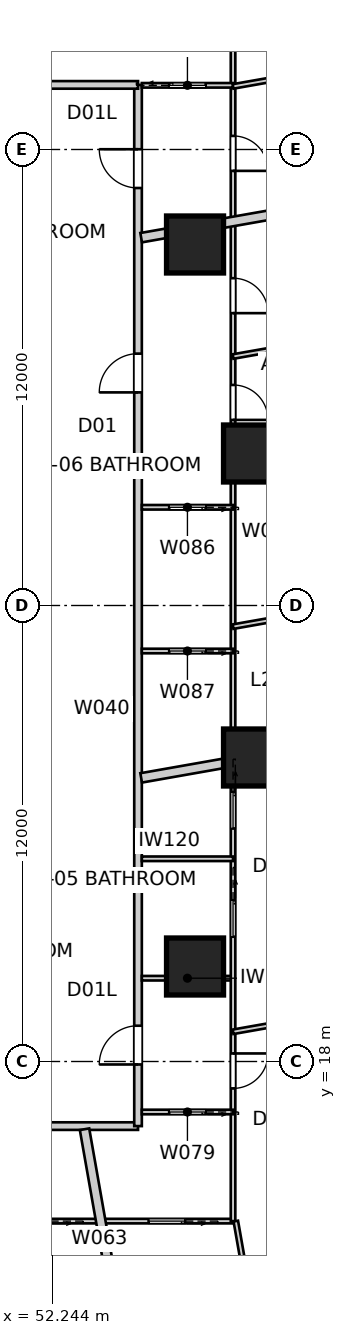
"""IFC4 building model, lengths in metres.
Left out: names, types, materials, properties, quantities, classifications, styles, units other than length and angle.
Written with IfcOpenShell. Run it as: python <this file> out.ifc"""

import sys

from ifc_helpers import new_model, si_unit, direction, frame, frame_2d, origin, origin_2d, place, context, subcontext, project, spatial, rectangle, extrude, element, fill, save


model = new_model("IFC4")
c1 = context("Model", 3, precision=1e-05, world=origin(), true_north=direction((0.0, 1.0)))
c2 = subcontext(c1, "Body", "Model", "MODEL_VIEW")
j1 = project(units=[si_unit("LENGTHUNIT", "METRE"), si_unit("PLANEANGLEUNIT", "RADIAN")], contexts=[c1])
p1 = place(None, origin())
s1 = spatial("IfcSite", under=j1, at=p1, CompositionType="ELEMENT")
p2 = place(p1, origin())
s2 = spatial("IfcBuilding", under=s1, at=p2, CompositionType="ELEMENT")
p3 = place(p2, frame((0.0, 0.0, 89.6)))
s3 = spatial("IfcBuildingStorey", under=s2, at=p3, CompositionType="ELEMENT", Elevation=89.6)
for number, where, z_axis, x_axis in (
    (1, (57.5, 26.0, 0.0), (0.0, 0.0, 1.0), (1.0, 0.0, 0.0)),
    (2, (57.5, 34.0, 0.0), (0.0, 0.0, 1.0), (1.0, 0.0, 0.0)),
    (3, (56.0, 39.5, 0.0), (0.0, 0.0, 1.0), (1.0, 0.0, 0.0)),
    (4, (56.0, 20.5, 0.0), (0.0, 0.0, 1.0), (1.0, 0.0, 0.0)),
):
    element("IfcColumn", number, at=place(p3, frame(where, z_axis=z_axis, x_axis=x_axis)), inside=s3, PredefinedType="COLUMN", context=c2, shape_type="SweptSolid", body=[
        extrude(rectangle(XDim=1.5, YDim=1.5, at=origin_2d()), origin(), (0.0, 0.0, 1.0), 3.4),
    ])
p4 = place(p3, frame((25.5, 16.3, 0.0), z_axis=(0.0, 0.0, 1.0), x_axis=(1.0, 0.0, 0.0)))
e5 = element("IfcWall", 5, at=p4, inside=s3, PredefinedType="PARTITIONING", context=c2, shape_type="SweptSolid", body=[
    extrude(rectangle(XDim=29.0, YDim=0.2, at=frame_2d((14.5, 0.0))), origin(), (0.0, 0.0, 1.0), 3.25),
])
p5 = place(p4, frame((20.896, 0.0, 0.0)))
e6 = element("IfcOpeningElement", 6, at=p5, cuts=e5, PredefinedType="OPENING", context=c2, shape_type="SweptSolid", body=[
    extrude(rectangle(XDim=1.02, YDim=2.34, at=frame_2d((0.51, 1.17))), frame((0.0, 0.11, 0.0), z_axis=(0.0, -1.0, 0.0), x_axis=(1.0, 0.0, 0.0)), (0.0, 0.0, 1.0), 0.22),
])
p6 = place(p4, frame((14.257, 0.0, 0.0)))
e7 = element("IfcOpeningElement", 7, at=p6, cuts=e5, PredefinedType="OPENING", context=c2, shape_type="SweptSolid", body=[
    extrude(rectangle(XDim=1.02, YDim=2.34, at=frame_2d((0.51, 1.17))), frame((0.0, 0.11, 0.0), z_axis=(0.0, -1.0, 0.0), x_axis=(1.0, 0.0, 0.0)), (0.0, 0.0, 1.0), 0.22),
])
p7 = place(p4, frame((3.857, 0.0, 0.0)))
e8 = element("IfcOpeningElement", 8, at=p7, cuts=e5, PredefinedType="OPENING", context=c2, shape_type="SweptSolid", body=[
    extrude(rectangle(XDim=1.02, YDim=2.34, at=frame_2d((0.51, 1.17))), frame((0.0, 0.11, 0.0), z_axis=(0.0, -1.0, 0.0), x_axis=(1.0, 0.0, 0.0)), (0.0, 0.0, 1.0), 0.22),
])
p8 = place(p3, frame((54.5, 16.3, 0.0), z_axis=(0.0, 0.0, 1.0), x_axis=(0.0, 1.0, 0.0)))
e9 = element("IfcWall", 9, at=p8, inside=s3, PredefinedType="PARTITIONING", context=c2, shape_type="SweptSolid", body=[
    extrude(rectangle(XDim=27.4, YDim=0.2, at=frame_2d((13.7, 0.0))), origin(), (0.0, 0.0, 1.0), 3.25),
])
p9 = place(p8, frame((19.308, 0.0, 0.0)))
e10 = element("IfcOpeningElement", 10, at=p9, cuts=e9, PredefinedType="OPENING", context=c2, shape_type="SweptSolid", body=[
    extrude(rectangle(XDim=1.02, YDim=2.34, at=frame_2d((0.51, 1.17))), frame((0.0, 0.11, 0.0), z_axis=(0.0, -1.0, 0.0), x_axis=(1.0, 0.0, 0.0)), (0.0, 0.0, 1.0), 0.22),
])
p10 = place(p8, frame((24.687, 0.0, 0.0)))
e11 = element("IfcOpeningElement", 11, at=p10, cuts=e9, PredefinedType="OPENING", context=c2, shape_type="SweptSolid", body=[
    extrude(rectangle(XDim=1.02, YDim=2.1, at=frame_2d((0.51, 1.05))), frame((0.0, 0.11, 0.0), z_axis=(0.0, -1.0, 0.0), x_axis=(1.0, 0.0, 0.0)), (0.0, 0.0, 1.0), 0.22),
])
p11 = place(p8, frame((1.622, 0.0, 0.0)))
e12 = element("IfcOpeningElement", 12, at=p11, cuts=e9, PredefinedType="OPENING", context=c2, shape_type="SweptSolid", body=[
    extrude(rectangle(XDim=1.02, YDim=2.1, at=frame_2d((0.51, 1.05))), frame((0.0, 0.11, 0.0), z_axis=(0.0, -1.0, 0.0), x_axis=(1.0, 0.0, 0.0)), (0.0, 0.0, 1.0), 0.22),
])
p12 = place(p3, frame((54.5, 43.7, 0.0), z_axis=(0.0, 0.0, 1.0), x_axis=(-1.0, 0.0, 0.0)))
e13 = element("IfcWall", 13, at=p12, inside=s3, PredefinedType="PARTITIONING", context=c2, shape_type="SweptSolid", body=[
    extrude(rectangle(XDim=29.0, YDim=0.2, at=frame_2d((14.5, 0.0))), origin(), (0.0, 0.0, 1.0), 3.25),
])
p13 = place(p12, frame((11.951, 0.0, 0.0)))
e14 = element("IfcOpeningElement", 14, at=p13, cuts=e13, PredefinedType="OPENING", context=c2, shape_type="SweptSolid", body=[
    extrude(rectangle(XDim=1.02, YDim=2.34, at=frame_2d((0.51, 1.17))), frame((0.0, 0.11, 0.0), z_axis=(0.0, -1.0, 0.0), x_axis=(1.0, 0.0, 0.0)), (0.0, 0.0, 1.0), 0.22),
])
p14 = place(p12, frame((4.795, 0.0, 0.0)))
e15 = element("IfcOpeningElement", 15, at=p14, cuts=e13, PredefinedType="OPENING", context=c2, shape_type="SweptSolid", body=[
    extrude(rectangle(XDim=1.02, YDim=2.34, at=frame_2d((0.51, 1.17))), frame((0.0, 0.11, 0.0), z_axis=(0.0, -1.0, 0.0), x_axis=(1.0, 0.0, 0.0)), (0.0, 0.0, 1.0), 0.22),
])
p15 = place(p3, frame((63.405, 41.235, 0.0), z_axis=(0.0, 0.0, 1.0), x_axis=(-0.984806596137, -0.173654738504, 0.0)))
e16 = element("IfcWall", 16, at=p15, inside=s3, PredefinedType="PARTITIONING", context=c2, shape_type="SweptSolid", body=[
    extrude(rectangle(XDim=8.958, YDim=0.25, at=frame_2d((4.479, 0.0))), origin(), (0.0, 0.0, 1.0), 3.25),
])
p16 = place(p3, frame((65.836, 27.448, 0.0), z_axis=(0.0, 0.0, 1.0), x_axis=(-0.98481000304, -0.173635416642, 0.0)))
e17 = element("IfcWall", 17, at=p16, inside=s3, PredefinedType="PARTITIONING", context=c2, shape_type="SweptSolid", body=[
    extrude(rectangle(XDim=11.427, YDim=0.25, at=frame_2d((5.713, 0.0))), origin(), (0.0, 0.0, 1.0), 3.25),
])
p17 = place(p3, frame((54.682, 7.203, 0.0), z_axis=(0.0, 0.0, 1.0), x_axis=(-0.173630137029, 0.984810933893, 0.0)))
e18 = element("IfcWall", 18, at=p17, inside=s3, PredefinedType="PARTITIONING", context=c2, shape_type="SweptSolid", body=[
    extrude(rectangle(XDim=9.154, YDim=0.25, at=frame_2d((4.577, 0.0))), origin(), (0.0, 0.0, 1.0), 3.25),
])
p18 = place(p3, frame((57.0, 13.8, 0.0), z_axis=(0.0, 0.0, 1.0), x_axis=(-1.0, 0.0, 0.0)))
e19 = element("IfcWall", 19, at=p18, inside=s3, PredefinedType="PARTITIONING", context=c2, shape_type="SweptSolid", body=[
    extrude(rectangle(XDim=34.0, YDim=0.12, at=frame_2d((17.0, 0.0))), origin(), (0.0, 0.0, 1.0), 2.55),
])
p19 = place(p18, frame((8.768, 0.0, 0.0)))
e20 = element("IfcOpeningElement", 20, at=p19, cuts=e19, PredefinedType="OPENING", context=c2, shape_type="SweptSolid", body=[
    extrude(rectangle(XDim=0.92, YDim=2.34, at=frame_2d((0.46, 1.17))), frame((0.0, 0.07, 0.0), z_axis=(0.0, -1.0, 0.0), x_axis=(1.0, 0.0, 0.0)), (0.0, 0.0, 1.0), 0.14),
])
p20 = place(p18, frame((10.995, 0.0, 0.0)))
e21 = element("IfcOpeningElement", 21, at=p20, cuts=e19, PredefinedType="OPENING", context=c2, shape_type="SweptSolid", body=[
    extrude(rectangle(XDim=0.92, YDim=2.34, at=frame_2d((0.46, 1.17))), frame((0.0, 0.07, 0.0), z_axis=(0.0, -1.0, 0.0), x_axis=(1.0, 0.0, 0.0)), (0.0, 0.0, 1.0), 0.14),
])
p21 = place(p18, frame((15.486, 0.0, 0.0)))
e22 = element("IfcOpeningElement", 22, at=p21, cuts=e19, PredefinedType="OPENING", context=c2, shape_type="SweptSolid", body=[
    extrude(rectangle(XDim=0.92, YDim=2.34, at=frame_2d((0.46, 1.17))), frame((0.0, 0.07, 0.0), z_axis=(0.0, -1.0, 0.0), x_axis=(1.0, 0.0, 0.0)), (0.0, 0.0, 1.0), 0.14),
])
p22 = place(p18, frame((4.804, 0.0, 0.0)))
e23 = element("IfcOpeningElement", 23, at=p22, cuts=e19, PredefinedType="OPENING", context=c2, shape_type="SweptSolid", body=[
    extrude(rectangle(XDim=0.96, YDim=2.1, at=frame_2d((0.48, 1.05))), frame((0.0, 0.07, 0.0), z_axis=(0.0, -1.0, 0.0), x_axis=(1.0, 0.0, 0.0)), (0.0, 0.0, 1.0), 0.14),
])
p23 = place(p18, frame((19.155, 0.0, 0.0)))
e24 = element("IfcOpeningElement", 24, at=p23, cuts=e19, PredefinedType="OPENING", context=c2, shape_type="SweptSolid", body=[
    extrude(rectangle(XDim=0.96, YDim=2.1, at=frame_2d((0.48, 1.05))), frame((0.0, 0.07, 0.0), z_axis=(0.0, -1.0, 0.0), x_axis=(1.0, 0.0, 0.0)), (0.0, 0.0, 1.0), 0.14),
])
p24 = place(p18, frame((31.473, 0.0, 0.0)))
e25 = element("IfcOpeningElement", 25, at=p24, cuts=e19, PredefinedType="OPENING", context=c2, shape_type="SweptSolid", body=[
    extrude(rectangle(XDim=0.96, YDim=2.1, at=frame_2d((0.48, 1.05))), frame((0.0, 0.07, 0.0), z_axis=(0.0, -1.0, 0.0), x_axis=(1.0, 0.0, 0.0)), (0.0, 0.0, 1.0), 0.14),
])
p25 = place(p18, frame((1.261, 0.0, 0.0)))
e26 = element("IfcOpeningElement", 26, at=p25, cuts=e19, PredefinedType="OPENING", context=c2, shape_type="SweptSolid", body=[
    extrude(rectangle(XDim=0.96, YDim=2.1, at=frame_2d((0.48, 1.05))), frame((0.0, 0.07, 0.0), z_axis=(0.0, -1.0, 0.0), x_axis=(1.0, 0.0, 0.0)), (0.0, 0.0, 1.0), 0.14),
])
p26 = place(p18, frame((22.627, 0.0, 0.0)))
e27 = element("IfcOpeningElement", 27, at=p26, cuts=e19, PredefinedType="OPENING", context=c2, shape_type="SweptSolid", body=[
    extrude(rectangle(XDim=0.96, YDim=2.1, at=frame_2d((0.48, 1.05))), frame((0.0, 0.07, 0.0), z_axis=(0.0, -1.0, 0.0), x_axis=(1.0, 0.0, 0.0)), (0.0, 0.0, 1.0), 0.14),
])
p27 = place(p3, frame((54.6, 20.192, 0.0), z_axis=(0.0, 0.0, 1.0), x_axis=(1.0, 0.0, 0.0)))
e28 = element("IfcWall", 28, at=p27, inside=s3, PredefinedType="PARTITIONING", context=c2, shape_type="SweptSolid", body=[
    extrude(rectangle(XDim=2.4, YDim=0.12, at=frame_2d((1.2, 0.0))), origin(), (0.0, 0.0, 1.0), 3.25),
])
p28 = place(p3, frame((57.0, 46.2, 0.0), z_axis=(0.0, 0.0, 1.0), x_axis=(0.0, -1.0, 0.0)))
e29 = element("IfcWall", 29, at=p28, inside=s3, PredefinedType="PARTITIONING", context=c2, shape_type="SweptSolid", body=[
    extrude(rectangle(XDim=32.4, YDim=0.12, at=frame_2d((16.2, 0.0))), origin(), (0.0, 0.0, 1.0), 2.55),
])
p29 = place(p28, frame((10.396, 0.0, 0.0)))
e30 = element("IfcOpeningElement", 30, at=p29, cuts=e29, PredefinedType="OPENING", context=c2, shape_type="SweptSolid", body=[
    extrude(rectangle(XDim=0.92, YDim=2.34, at=frame_2d((0.46, 1.17))), frame((0.0, 0.07, 0.0), z_axis=(0.0, -1.0, 0.0), x_axis=(1.0, 0.0, 0.0)), (0.0, 0.0, 1.0), 0.14),
])
p30 = place(p28, frame((7.587, 0.0, 0.0)))
e31 = element("IfcOpeningElement", 31, at=p30, cuts=e29, PredefinedType="OPENING", context=c2, shape_type="SweptSolid", body=[
    extrude(rectangle(XDim=0.92, YDim=2.34, at=frame_2d((0.46, 1.17))), frame((0.0, 0.07, 0.0), z_axis=(0.0, -1.0, 0.0), x_axis=(1.0, 0.0, 0.0)), (0.0, 0.0, 1.0), 0.14),
])
p31 = place(p28, frame((3.843, 0.0, 0.0)))
e32 = element("IfcOpeningElement", 32, at=p31, cuts=e29, PredefinedType="OPENING", context=c2, shape_type="SweptSolid", body=[
    extrude(rectangle(XDim=0.92, YDim=2.34, at=frame_2d((0.46, 1.17))), frame((0.0, 0.07, 0.0), z_axis=(0.0, -1.0, 0.0), x_axis=(1.0, 0.0, 0.0)), (0.0, 0.0, 1.0), 0.14),
])
p32 = place(p28, frame((27.988, 0.0, 0.0)))
e33 = element("IfcOpeningElement", 33, at=p32, cuts=e29, PredefinedType="OPENING", context=c2, shape_type="SweptSolid", body=[
    extrude(rectangle(XDim=0.92, YDim=2.34, at=frame_2d((0.46, 1.17))), frame((0.0, 0.07, 0.0), z_axis=(0.0, -1.0, 0.0), x_axis=(1.0, 0.0, 0.0)), (0.0, 0.0, 1.0), 0.14),
])
p33 = place(p28, frame((23.957, 0.0, 0.0)))
e34 = element("IfcOpeningElement", 34, at=p33, cuts=e29, PredefinedType="OPENING", context=c2, shape_type="SweptSolid", body=[
    extrude(rectangle(XDim=0.96, YDim=2.1, at=frame_2d((0.48, 1.05))), frame((0.0, 0.07, 0.0), z_axis=(0.0, -1.0, 0.0), x_axis=(1.0, 0.0, 0.0)), (0.0, 0.0, 1.0), 0.14),
])
p34 = place(p28, frame((21.108, 0.0, 0.0)))
e35 = element("IfcOpeningElement", 35, at=p34, cuts=e29, PredefinedType="OPENING", context=c2, shape_type="SweptSolid", body=[
    extrude(rectangle(XDim=0.96, YDim=2.1, at=frame_2d((0.48, 1.05))), frame((0.0, 0.07, 0.0), z_axis=(0.0, -1.0, 0.0), x_axis=(1.0, 0.0, 0.0)), (0.0, 0.0, 1.0), 0.14),
])
p35 = place(p3, frame((57.0, 16.671, 0.0), z_axis=(0.0, 0.0, 1.0), x_axis=(-1.0, 0.0, 0.0)))
e36 = element("IfcWall", 36, at=p35, inside=s3, PredefinedType="PARTITIONING", context=c2, shape_type="SweptSolid", body=[
    extrude(rectangle(XDim=2.4, YDim=0.12, at=frame_2d((1.2, 0.0))), origin(), (0.0, 0.0, 1.0), 3.25),
])
p36 = place(p35, frame((0.72, 0.0, 0.0)))
e37 = element("IfcOpeningElement", 37, at=p36, cuts=e36, PredefinedType="OPENING", context=c2, shape_type="SweptSolid", body=[
    extrude(rectangle(XDim=0.96, YDim=2.1, at=frame_2d((0.48, 1.05))), frame((0.0, 0.07, 0.0), z_axis=(0.0, -1.0, 0.0), x_axis=(1.0, 0.0, 0.0)), (0.0, 0.0, 1.0), 0.14),
])
p37 = place(p3, frame((54.6, 23.335, 0.0), z_axis=(0.0, 0.0, 1.0), x_axis=(1.0, 0.0, 0.0)))
e38 = element("IfcWall", 38, at=p37, inside=s3, PredefinedType="PARTITIONING", context=c2, shape_type="SweptSolid", body=[
    extrude(rectangle(XDim=2.4, YDim=0.12, at=frame_2d((1.2, 0.0))), origin(), (0.0, 0.0, 1.0), 3.25),
])
p38 = place(p3, frame((67.012, 20.547, 0.0), z_axis=(0.0, 0.0, 1.0), x_axis=(-0.984807724889, -0.173648337162, 0.0)))
e39 = element("IfcWall", 39, at=p38, inside=s3, PredefinedType="PARTITIONING", context=c2, shape_type="SweptSolid", body=[
    extrude(rectangle(XDim=10.167, YDim=0.12, at=frame_2d((5.083, 0.0))), origin(), (0.0, 0.0, 1.0), 2.638),
])
p39 = place(p38, frame((8.328, 0.0, 0.0)))
e40 = element("IfcOpeningElement", 40, at=p39, cuts=e39, PredefinedType="OPENING", context=c2, shape_type="SweptSolid", body=[
    extrude(rectangle(XDim=0.92, YDim=2.34, at=frame_2d((0.46, 1.17))), frame((0.0, 0.07, 0.0), z_axis=(0.0, -1.0, 0.0), x_axis=(1.0, 0.0, 0.0)), (0.0, 0.0, 1.0), 0.14),
])
p40 = place(p3, frame((58.122, 7.85, 0.0), z_axis=(0.0, 0.0, 1.0), x_axis=(-0.173644708382, 0.984808364734, 0.0)))
e41 = element("IfcWall", 41, at=p40, inside=s3, PredefinedType="PARTITIONING", context=c2, shape_type="SweptSolid", body=[
    extrude(rectangle(XDim=6.042, YDim=0.12, at=frame_2d((3.021, 0.0))), origin(), (0.0, 0.0, 1.0), 2.638),
])
p41 = place(p3, frame((57.0, 32.585, 0.0), z_axis=(0.0, 0.0, 1.0), x_axis=(-1.0, 0.0, 0.0)))
e42 = element("IfcWall", 42, at=p41, inside=s3, PredefinedType="PARTITIONING", context=c2, shape_type="SweptSolid", body=[
    extrude(rectangle(XDim=2.4, YDim=0.12, at=frame_2d((1.2, 0.0))), origin(), (0.0, 0.0, 1.0), 3.25),
])
p42 = place(p41, frame((0.72, 0.0, 0.0)))
e43 = element("IfcOpeningElement", 43, at=p42, cuts=e42, PredefinedType="OPENING", context=c2, shape_type="SweptSolid", body=[
    extrude(rectangle(XDim=0.96, YDim=2.1, at=frame_2d((0.48, 1.05))), frame((0.0, 0.07, 0.0), z_axis=(0.0, -1.0, 0.0), x_axis=(1.0, 0.0, 0.0)), (0.0, 0.0, 1.0), 0.14),
])
p43 = place(p3, frame((57.0, 28.802, 0.0), z_axis=(0.0, 0.0, 1.0), x_axis=(-1.0, 0.0, 0.0)))
e44 = element("IfcWall", 44, at=p43, inside=s3, PredefinedType="PARTITIONING", context=c2, shape_type="SweptSolid", body=[
    extrude(rectangle(XDim=2.4, YDim=0.12, at=frame_2d((1.2, 0.0))), origin(), (0.0, 0.0, 1.0), 3.25),
])
p44 = place(p43, frame((0.72, 0.0, 0.0)))
e45 = element("IfcOpeningElement", 45, at=p44, cuts=e44, PredefinedType="OPENING", context=c2, shape_type="SweptSolid", body=[
    extrude(rectangle(XDim=0.96, YDim=2.1, at=frame_2d((0.48, 1.05))), frame((0.0, 0.07, 0.0), z_axis=(0.0, -1.0, 0.0), x_axis=(1.0, 0.0, 0.0)), (0.0, 0.0, 1.0), 0.14),
])
p45 = place(p3, frame((65.188, 30.887, 0.0), z_axis=(0.0, 0.0, 1.0), x_axis=(-0.984807787824, -0.173647980238, 0.0)))
e46 = element("IfcWall", 46, at=p45, inside=s3, PredefinedType="PARTITIONING", context=c2, shape_type="SweptSolid", body=[
    extrude(rectangle(XDim=8.315, YDim=0.12, at=frame_2d((4.157, 0.0))), origin(), (0.0, 0.0, 1.0), 3.25),
])
p46 = place(p45, frame((3.677, 0.0, 0.0)))
e47 = element("IfcOpeningElement", 47, at=p46, cuts=e46, PredefinedType="OPENING", context=c2, shape_type="SweptSolid", body=[
    extrude(rectangle(XDim=0.92, YDim=2.34, at=frame_2d((0.46, 1.17))), frame((0.0, 0.07, 0.0), z_axis=(0.0, -1.0, 0.0), x_axis=(1.0, 0.0, 0.0)), (0.0, 0.0, 1.0), 0.14),
])
p47 = place(p3, frame((57.0, 36.552, 0.0), z_axis=(0.0, 0.0, 1.0), x_axis=(0.984809234282, 0.173639776761, 0.0)))
e48 = element("IfcWall", 48, at=p47, inside=s3, PredefinedType="PARTITIONING", context=c2, shape_type="SweptSolid", body=[
    extrude(rectangle(XDim=7.081, YDim=0.12, at=frame_2d((3.541, 0.0))), origin(), (0.0, 0.0, 1.0), 3.25),
])
p48 = place(p3, frame((54.6, 43.689, 0.0), z_axis=(0.0, 0.0, 1.0), x_axis=(1.0, 0.0, 0.0)))
e49 = element("IfcWall", 49, at=p48, inside=s3, PredefinedType="PARTITIONING", context=c2, shape_type="SweptSolid", body=[
    extrude(rectangle(XDim=2.4, YDim=0.12, at=frame_2d((1.2, 0.0))), origin(), (0.0, 0.0, 1.0), 3.25),
])
p49 = place(p48, frame((0.72, 0.0, 0.0)))
e50 = element("IfcOpeningElement", 50, at=p49, cuts=e49, PredefinedType="OPENING", context=c2, shape_type="SweptSolid", body=[
    extrude(rectangle(XDim=0.96, YDim=2.1, at=frame_2d((0.48, 1.05))), frame((0.0, 0.07, 0.0), z_axis=(0.0, -1.0, 0.0), x_axis=(1.0, 0.0, 0.0)), (0.0, 0.0, 1.0), 0.14),
])
p50 = place(p3, frame((62.758, 44.675, 0.0), z_axis=(0.0, 0.0, 1.0), x_axis=(-0.984810032319, -0.173635250578, 0.0)))
e51 = element("IfcWall", 51, at=p50, inside=s3, PredefinedType="PARTITIONING", context=c2, shape_type="SweptSolid", body=[
    extrude(rectangle(XDim=5.846, YDim=0.12, at=frame_2d((2.923, 0.0))), origin(), (0.0, 0.0, 1.0), 3.25),
])
p51 = place(p50, frame((2.443, 0.0, 0.0)))
e52 = element("IfcOpeningElement", 52, at=p51, cuts=e51, PredefinedType="OPENING", context=c2, shape_type="SweptSolid", body=[
    extrude(rectangle(XDim=0.92, YDim=2.34, at=frame_2d((0.46, 1.17))), frame((0.0, 0.07, 0.0), z_axis=(0.0, -1.0, 0.0), x_axis=(1.0, 0.0, 0.0)), (0.0, 0.0, 1.0), 0.14),
])
p52 = place(p9, origin())
e53 = element("IfcDoor", 53, at=p52, inside=s3, OperationType="SINGLE_SWING_LEFT", PredefinedType="DOOR", context=c2, shape_type="SweptSolid", body=[
    extrude(rectangle(XDim=1.02, YDim=2.34, at=frame_2d((0.51, 1.17))), frame((0.0, 0.025, 0.0), z_axis=(0.0, -1.0, 0.0), x_axis=(1.0, 0.0, 0.0)), (0.0, 0.0, 1.0), 0.05),
])
fill(e10, e53)
p53 = place(p10, origin())
e54 = element("IfcDoor", 54, at=p53, inside=s3, OperationType="SINGLE_SWING_RIGHT", PredefinedType="DOOR", context=c2, shape_type="SweptSolid", body=[
    extrude(rectangle(XDim=1.02, YDim=2.1, at=frame_2d((0.51, 1.05))), frame((0.0, 0.025, 0.0), z_axis=(0.0, -1.0, 0.0), x_axis=(1.0, 0.0, 0.0)), (0.0, 0.0, 1.0), 0.05),
])
fill(e11, e54)
p54 = place(p11, origin())
e55 = element("IfcDoor", 55, at=p54, inside=s3, OperationType="SINGLE_SWING_LEFT", PredefinedType="DOOR", context=c2, shape_type="SweptSolid", body=[
    extrude(rectangle(XDim=1.02, YDim=2.1, at=frame_2d((0.51, 1.05))), frame((0.0, 0.025, 0.0), z_axis=(0.0, -1.0, 0.0), x_axis=(1.0, 0.0, 0.0)), (0.0, 0.0, 1.0), 0.05),
])
fill(e12, e55)
p55 = place(p29, origin())
e56 = element("IfcDoor", 56, at=p55, inside=s3, OperationType="SINGLE_SWING_RIGHT", PredefinedType="DOOR", context=c2, shape_type="SweptSolid", body=[
    extrude(rectangle(XDim=0.92, YDim=2.34, at=frame_2d((0.46, 1.17))), frame((0.0, 0.025, 0.0), z_axis=(0.0, -1.0, 0.0), x_axis=(1.0, 0.0, 0.0)), (0.0, 0.0, 1.0), 0.05),
])
fill(e30, e56)
p56 = place(p30, origin())
e57 = element("IfcDoor", 57, at=p56, inside=s3, OperationType="SINGLE_SWING_RIGHT", PredefinedType="DOOR", context=c2, shape_type="SweptSolid", body=[
    extrude(rectangle(XDim=0.92, YDim=2.34, at=frame_2d((0.46, 1.17))), frame((0.0, 0.025, 0.0), z_axis=(0.0, -1.0, 0.0), x_axis=(1.0, 0.0, 0.0)), (0.0, 0.0, 1.0), 0.05),
])
fill(e31, e57)
p57 = place(p42, origin())
e58 = element("IfcDoor", 58, at=p57, inside=s3, OperationType="SLIDING_TO_LEFT", PredefinedType="DOOR", context=c2, shape_type="SweptSolid", body=[
    extrude(rectangle(XDim=0.96, YDim=2.1, at=frame_2d((0.48, 1.05))), frame((0.0, 0.025, 0.0), z_axis=(0.0, -1.0, 0.0), x_axis=(1.0, 0.0, 0.0)), (0.0, 0.0, 1.0), 0.05),
])
fill(e43, e58)
p58 = place(p31, origin())
e59 = element("IfcDoor", 59, at=p58, inside=s3, OperationType="SINGLE_SWING_RIGHT", PredefinedType="DOOR", context=c2, shape_type="SweptSolid", body=[
    extrude(rectangle(XDim=0.92, YDim=2.34, at=frame_2d((0.46, 1.17))), frame((0.0, 0.025, 0.0), z_axis=(0.0, -1.0, 0.0), x_axis=(1.0, 0.0, 0.0)), (0.0, 0.0, 1.0), 0.05),
])
fill(e32, e59)
p59 = place(p49, origin())
e60 = element("IfcDoor", 60, at=p59, inside=s3, OperationType="SLIDING_TO_LEFT", PredefinedType="DOOR", context=c2, shape_type="SweptSolid", body=[
    extrude(rectangle(XDim=0.96, YDim=2.1, at=frame_2d((0.48, 1.05))), frame((0.0, 0.025, 0.0), z_axis=(0.0, -1.0, 0.0), x_axis=(1.0, 0.0, 0.0)), (0.0, 0.0, 1.0), 0.05),
])
fill(e50, e60)
p60 = place(p36, origin())
e61 = element("IfcDoor", 61, at=p60, inside=s3, OperationType="SLIDING_TO_LEFT", PredefinedType="DOOR", context=c2, shape_type="SweptSolid", body=[
    extrude(rectangle(XDim=0.96, YDim=2.1, at=frame_2d((0.48, 1.05))), frame((0.0, 0.025, 0.0), z_axis=(0.0, -1.0, 0.0), x_axis=(1.0, 0.0, 0.0)), (0.0, 0.0, 1.0), 0.05),
])
fill(e37, e61)
p61 = place(p32, origin())
e62 = element("IfcDoor", 62, at=p61, inside=s3, OperationType="SINGLE_SWING_LEFT", PredefinedType="DOOR", context=c2, shape_type="SweptSolid", body=[
    extrude(rectangle(XDim=0.92, YDim=2.34, at=frame_2d((0.46, 1.17))), frame((0.0, 0.025, 0.0), z_axis=(0.0, -1.0, 0.0), x_axis=(1.0, 0.0, 0.0)), (0.0, 0.0, 1.0), 0.05),
])
fill(e33, e62)
p62 = place(p44, origin())
e63 = element("IfcDoor", 63, at=p62, inside=s3, OperationType="SLIDING_TO_LEFT", PredefinedType="DOOR", context=c2, shape_type="SweptSolid", body=[
    extrude(rectangle(XDim=0.96, YDim=2.1, at=frame_2d((0.48, 1.05))), frame((0.0, 0.025, 0.0), z_axis=(0.0, -1.0, 0.0), x_axis=(1.0, 0.0, 0.0)), (0.0, 0.0, 1.0), 0.05),
])
fill(e45, e63)
p63 = place(p25, origin())
e64 = element("IfcDoor", 64, at=p63, inside=s3, OperationType="SLIDING_TO_LEFT", PredefinedType="DOOR", context=c2, shape_type="SweptSolid", body=[
    extrude(rectangle(XDim=0.96, YDim=2.1, at=frame_2d((0.48, 1.05))), frame((0.0, 0.025, 0.0), z_axis=(0.0, -1.0, 0.0), x_axis=(1.0, 0.0, 0.0)), (0.0, 0.0, 1.0), 0.05),
])
fill(e26, e64)
p64 = place(p33, origin())
e65 = element("IfcDoor", 65, at=p64, inside=s3, OperationType="SLIDING_TO_LEFT", PredefinedType="DOOR", context=c2, shape_type="SweptSolid", body=[
    extrude(rectangle(XDim=0.96, YDim=2.1, at=frame_2d((0.48, 1.05))), frame((0.0, 0.025, 0.0), z_axis=(0.0, -1.0, 0.0), x_axis=(1.0, 0.0, 0.0)), (0.0, 0.0, 1.0), 0.05),
])
fill(e34, e65)
p65 = place(p34, origin())
e66 = element("IfcDoor", 66, at=p65, inside=s3, OperationType="SLIDING_TO_LEFT", PredefinedType="DOOR", context=c2, shape_type="SweptSolid", body=[
    extrude(rectangle(XDim=0.96, YDim=2.1, at=frame_2d((0.48, 1.05))), frame((0.0, 0.025, 0.0), z_axis=(0.0, -1.0, 0.0), x_axis=(1.0, 0.0, 0.0)), (0.0, 0.0, 1.0), 0.05),
])
fill(e35, e66)
save(model, sys.argv[1])
